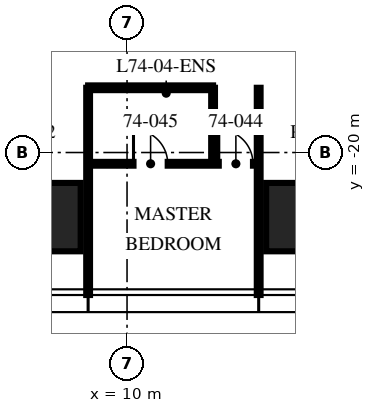
"""IFC4 building model, lengths in metres.
Left out: names, types, materials, properties, quantities, classifications, styles, units other than length and angle.
Written with IfcOpenShell. Run it as: python <this file> out.ifc"""

import sys

from ifc_helpers import new_model, si_unit, direction, frame, frame_2d, origin, origin_2d, place, context, subcontext, project, spatial, rectangle, extrude, element, fill, save


model = new_model("IFC4")
c1 = context("Model", 3, precision=1e-05, world=origin(), true_north=direction((0.0, 1.0)))
c2 = subcontext(c1, "Body", "Model", "MODEL_VIEW")
j1 = project(units=[si_unit("LENGTHUNIT", "METRE"), si_unit("PLANEANGLEUNIT", "RADIAN")], contexts=[c1])
p1 = place(None, origin())
s1 = spatial("IfcSite", under=j1, at=p1, CompositionType="ELEMENT")
p2 = place(p1, origin())
s2 = spatial("IfcBuilding", under=s1, at=p2, CompositionType="ELEMENT")
p3 = place(p2, frame((0.0, 0.0, 297.0)))
s3 = spatial("IfcBuildingStorey", under=s2, at=p3, CompositionType="ELEMENT", Elevation=297.0)
for number, where, z_axis, x_axis in (
    (1, (14.96, -21.7, 0.0), (0.0, 0.0, 1.0), (1.0, 0.0, 0.0)),
    (2, (7.48, -21.7, 0.0), (0.0, 0.0, 1.0), (1.0, 0.0, 0.0)),
):
    element("IfcColumn", number, at=place(p3, frame(where, z_axis=z_axis, x_axis=x_axis)), inside=s3, PredefinedType="COLUMN", context=c2, shape_type="SweptSolid", body=[
        extrude(rectangle(XDim=2.6, YDim=1.8, at=origin_2d()), origin(), (0.0, 0.0, 1.0), 3.75),
    ])
for number, where, z_axis, x_axis in (
    (3, (8.976, -18.296, 0.0), (0.0, 0.0, 1.0), (0.0, -1.0, 0.0)),
    (4, (13.464, -18.296, 0.0), (0.0, 0.0, 1.0), (0.0, -1.0, 0.0)),
):
    element("IfcWall", number, at=place(p3, frame(where, z_axis=z_axis, x_axis=x_axis)), inside=s3, PredefinedType="PARTITIONING", context=c2, shape_type="SweptSolid", body=[
        extrude(rectangle(XDim=5.454, YDim=0.1, at=frame_2d((2.727, 0.0))), origin(), (0.0, 0.0, 1.0), 3.01),
    ])
p4 = place(p3, frame((8.976, -20.296, 0.0), z_axis=(0.0, 0.0, 1.0), x_axis=(1.0, 0.0, 0.0)))
e5 = element("IfcWall", 5, at=p4, inside=s3, PredefinedType="PARTITIONING", context=c2, shape_type="SweptSolid", body=[
    extrude(rectangle(XDim=4.488, YDim=0.1, at=frame_2d((2.244, 0.0))), origin(), (0.0, 0.0, 1.0), 2.91),
])
p5 = place(p4, frame((3.438, 0.0, 0.0)))
e6 = element("IfcOpeningElement", 6, at=p5, cuts=e5, PredefinedType="OPENING", context=c2, shape_type="SweptSolid", body=[
    extrude(rectangle(XDim=0.9, YDim=2.1, at=frame_2d((0.45, 1.05))), frame((0.0, 0.06, 0.0), z_axis=(0.0, -1.0, 0.0), x_axis=(1.0, 0.0, 0.0)), (0.0, 0.0, 1.0), 0.12),
])
p6 = place(p4, frame((1.194, 0.0, 0.0)))
e7 = element("IfcOpeningElement", 7, at=p6, cuts=e5, PredefinedType="OPENING", context=c2, shape_type="SweptSolid", body=[
    extrude(rectangle(XDim=0.9, YDim=2.1, at=frame_2d((0.45, 1.05))), frame((0.0, 0.06, 0.0), z_axis=(0.0, -1.0, 0.0), x_axis=(1.0, 0.0, 0.0)), (0.0, 0.0, 1.0), 0.12),
])
p7 = place(p3, frame((12.264, -18.296, 0.0), z_axis=(0.0, 0.0, 1.0), x_axis=(0.0, -1.0, 0.0)))
e8 = element("IfcWall", 8, at=p7, inside=s3, PredefinedType="PARTITIONING", context=c2, shape_type="SweptSolid", body=[
    extrude(rectangle(XDim=2.0, YDim=0.1, at=frame_2d((1.0, 0.0))), origin(), (0.0, 0.0, 1.0), 3.5),
])
p8 = place(p3, frame((8.976, -18.296, 0.0), z_axis=(0.0, 0.0, 1.0), x_axis=(1.0, 0.0, 0.0)))
e9 = element("IfcWall", 9, at=p8, inside=s3, PredefinedType="PARTITIONING", context=c2, shape_type="SweptSolid", body=[
    extrude(rectangle(XDim=3.288, YDim=0.125, at=frame_2d((1.644, 0.0))), origin(), (0.0, 0.0, 1.0), 2.91),
])
p9 = place(p5, origin())
e10 = element("IfcDoor", 10, at=p9, inside=s3, OperationType="SINGLE_SWING_LEFT", PredefinedType="DOOR", context=c2, shape_type="SweptSolid", body=[
    extrude(rectangle(XDim=0.9, YDim=2.1, at=frame_2d((0.45, 1.05))), frame((0.0, 0.025, 0.0), z_axis=(0.0, -1.0, 0.0), x_axis=(1.0, 0.0, 0.0)), (0.0, 0.0, 1.0), 0.05),
])
fill(e6, e10)
p10 = place(p6, origin())
e11 = element("IfcDoor", 11, at=p10, inside=s3, OperationType="SINGLE_SWING_LEFT", PredefinedType="DOOR", context=c2, shape_type="SweptSolid", body=[
    extrude(rectangle(XDim=0.9, YDim=2.1, at=frame_2d((0.45, 1.05))), frame((0.0, 0.025, 0.0), z_axis=(0.0, -1.0, 0.0), x_axis=(1.0, 0.0, 0.0)), (0.0, 0.0, 1.0), 0.05),
])
fill(e7, e11)
save(model, sys.argv[1])
